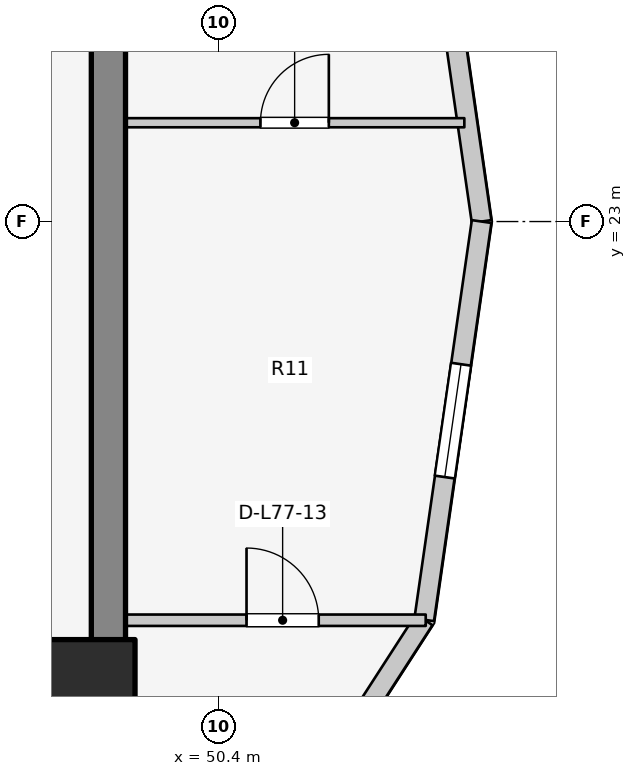
"""IFC4 building model, lengths in metres.
Left out: names, types, materials, properties, quantities, classifications, styles, units other than length and angle.
Written with IfcOpenShell. Run it as: python <this file> out.ifc"""

import sys

from ifc_helpers import new_model, si_unit, direction, frame, frame_2d, origin, origin_2d, place, context, subcontext, project, spatial, rectangle, extrude, element, fill, save


model = new_model("IFC4")
c1 = context("Model", 3, precision=1e-05, world=origin(), true_north=direction((0.0, 1.0)))
c2 = subcontext(c1, "Body", "Model", "MODEL_VIEW")
j1 = project(units=[si_unit("LENGTHUNIT", "METRE"), si_unit("PLANEANGLEUNIT", "RADIAN")], contexts=[c1])
p1 = place(None, origin())
s1 = spatial("IfcSite", under=j1, at=p1, CompositionType="ELEMENT")
p2 = place(p1, origin())
s2 = spatial("IfcBuilding", under=s1, at=p2, CompositionType="ELEMENT")
p3 = place(p2, frame((0.0, 0.0, 253.2)))
s3 = spatial("IfcBuildingStorey", under=s2, at=p3, CompositionType="ELEMENT", Elevation=253.2)
p4 = place(p3, frame((48.95, 17.05, 0.0), z_axis=(0.0, 0.0, 1.0), x_axis=(0.0, 1.0, 0.0)))
e1 = element("IfcWall", 1, at=p4, inside=s3, PredefinedType="SHEAR", context=c2, shape_type="SweptSolid", body=[
    extrude(rectangle(XDim=12.8, YDim=0.45, at=frame_2d((6.4, 0.0))), origin(), (0.0, 0.0, 1.0), 3.6),
])
p5 = place(p3, frame((48.7, 16.9, 0.0), z_axis=(0.0, 0.0, 1.0), x_axis=(1.0, 0.0, 0.0)))
e2 = element("IfcColumn", 2, at=p5, inside=s3, PredefinedType="COLUMN", context=c2, shape_type="SweptSolid", body=[
    extrude(rectangle(XDim=1.2, YDim=1.2, at=origin_2d()), origin(), (0.0, 0.0, 1.0), 3.6),
])
p6 = place(p3, frame((53.86, 23.0, 0.0), z_axis=(0.0, 0.0, 1.0), x_axis=(-0.142712754019, 0.989764148593, 0.0)))
e3 = element("IfcWall", 3, at=p6, inside=s3, PredefinedType="STANDARD", context=c2, shape_type="SweptSolid", body=[
    extrude(rectangle(XDim=5.293, YDim=0.26, at=frame_2d((2.646, 0.0))), origin(), (0.0, 0.0, 1.0), 3.29),
])
p7 = place(p6, frame((2.678, 0.0, 0.75)))
e4 = element("IfcOpeningElement", 4, at=p7, cuts=e3, PredefinedType="OPENING", context=c2, shape_type="SweptSolid", body=[
    extrude(rectangle(XDim=1.2, YDim=1.5, at=frame_2d((0.6, 0.75))), frame((0.0, 0.14, 0.0), z_axis=(0.0, -1.0, 0.0), x_axis=(1.0, 0.0, 0.0)), (0.0, 0.0, 1.0), 0.28),
])
p8 = place(p3, frame((50.761, 14.133, 0.0), z_axis=(0.0, 0.0, 1.0), x_axis=(0.542641766008, 0.839964233634, 0.0)))
e5 = element("IfcWall", 5, at=p8, inside=s3, PredefinedType="STANDARD", context=c2, shape_type="SweptSolid", body=[
    extrude(rectangle(XDim=4.319, YDim=0.26, at=frame_2d((2.16, 0.0))), origin(), (0.0, 0.0, 1.0), 3.29),
])
p9 = place(p8, frame((1.41, 0.0, 0.75)))
e6 = element("IfcOpeningElement", 6, at=p9, cuts=e5, PredefinedType="OPENING", context=c2, shape_type="SweptSolid", body=[
    extrude(rectangle(XDim=1.5, YDim=1.6, at=frame_2d((0.75, 0.8))), frame((0.0, 0.14, 0.0), z_axis=(0.0, -1.0, 0.0), x_axis=(1.0, 0.0, 0.0)), (0.0, 0.0, 1.0), 0.28),
])
p10 = place(p3, frame((53.105, 17.761, 0.0), z_axis=(0.0, 0.0, 1.0), x_axis=(0.142712754019, 0.989764148593, 0.0)))
e7 = element("IfcWall", 7, at=p10, inside=s3, PredefinedType="STANDARD", context=c2, shape_type="SweptSolid", body=[
    extrude(rectangle(XDim=5.293, YDim=0.26, at=frame_2d((2.646, 0.0))), origin(), (0.0, 0.0, 1.0), 3.29),
])
p11 = place(p10, frame((1.896, 0.0, 0.75)))
e8 = element("IfcOpeningElement", 8, at=p11, cuts=e7, PredefinedType="OPENING", context=c2, shape_type="SweptSolid", body=[
    extrude(rectangle(XDim=1.5, YDim=1.6, at=frame_2d((0.75, 0.8))), frame((0.0, 0.14, 0.0), z_axis=(0.0, -1.0, 0.0), x_axis=(1.0, 0.0, 0.0)), (0.0, 0.0, 1.0), 0.28),
])
p12 = place(p3, frame((48.95, 17.755, 0.0), z_axis=(0.0, 0.0, 1.0), x_axis=(1.0, 0.0, 0.0)))
e9 = element("IfcWall", 9, at=p12, inside=s3, PredefinedType="PARTITIONING", context=c2, shape_type="SweptSolid", body=[
    extrude(rectangle(XDim=4.175, YDim=0.15, at=frame_2d((2.087, 0.0))), origin(), (0.0, 0.0, 1.0), 3.295),
])
p13 = place(p12, frame((1.817, 0.0, 0.0)))
e10 = element("IfcOpeningElement", 10, at=p13, cuts=e9, PredefinedType="OPENING", context=c2, shape_type="SweptSolid", body=[
    extrude(rectangle(XDim=0.95, YDim=2.1, at=frame_2d((0.475, 1.05))), frame((0.0, 0.085, 0.0), z_axis=(0.0, -1.0, 0.0), x_axis=(1.0, 0.0, 0.0)), (0.0, 0.0, 1.0), 0.17),
])
p14 = place(p3, frame((48.95, 24.3, 0.0), z_axis=(0.0, 0.0, 1.0), x_axis=(1.0, 0.0, 0.0)))
e11 = element("IfcWall", 11, at=p14, inside=s3, PredefinedType="MOVABLE", context=c2, shape_type="SweptSolid", body=[
    extrude(rectangle(XDim=4.683, YDim=0.12, at=frame_2d((2.341, 0.0))), origin(), (0.0, 0.0, 1.0), 3.295),
])
p15 = place(p14, frame((2.0, 0.0, 0.0)))
e12 = element("IfcOpeningElement", 12, at=p15, cuts=e11, PredefinedType="OPENING", context=c2, shape_type="SweptSolid", body=[
    extrude(rectangle(XDim=0.9, YDim=2.1, at=frame_2d((0.45, 1.05))), frame((0.0, 0.07, 0.0), z_axis=(0.0, -1.0, 0.0), x_axis=(1.0, 0.0, 0.0)), (0.0, 0.0, 1.0), 0.14),
])
p16 = place(p11, origin())
e13 = element("IfcWindow", 13, at=p16, inside=s3, PartitioningType="SINGLE_PANEL", PredefinedType="WINDOW", context=c2, shape_type="SweptSolid", body=[
    extrude(rectangle(XDim=1.5, YDim=1.6, at=frame_2d((0.75, 0.8))), frame((0.0, 0.03, 0.0), z_axis=(0.0, -1.0, 0.0), x_axis=(1.0, 0.0, 0.0)), (0.0, 0.0, 1.0), 0.06),
])
fill(e8, e13)
p17 = place(p13, origin())
e14 = element("IfcDoor", 14, at=p17, inside=s3, OperationType="SINGLE_SWING_LEFT", PredefinedType="DOOR", context=c2, shape_type="SweptSolid", body=[
    extrude(rectangle(XDim=0.95, YDim=2.1, at=frame_2d((0.475, 1.05))), frame((0.0, 0.025, 0.0), z_axis=(0.0, -1.0, 0.0), x_axis=(1.0, 0.0, 0.0)), (0.0, 0.0, 1.0), 0.05),
])
fill(e10, e14)
p18 = place(p15, origin())
e15 = element("IfcDoor", 15, at=p18, inside=s3, OperationType="SINGLE_SWING_RIGHT", PredefinedType="DOOR", context=c2, shape_type="SweptSolid", body=[
    extrude(rectangle(XDim=0.9, YDim=2.1, at=frame_2d((0.45, 1.05))), frame((0.0, 0.025, 0.0), z_axis=(0.0, -1.0, 0.0), x_axis=(1.0, 0.0, 0.0)), (0.0, 0.0, 1.0), 0.05),
])
fill(e12, e15)
save(model, sys.argv[1])
